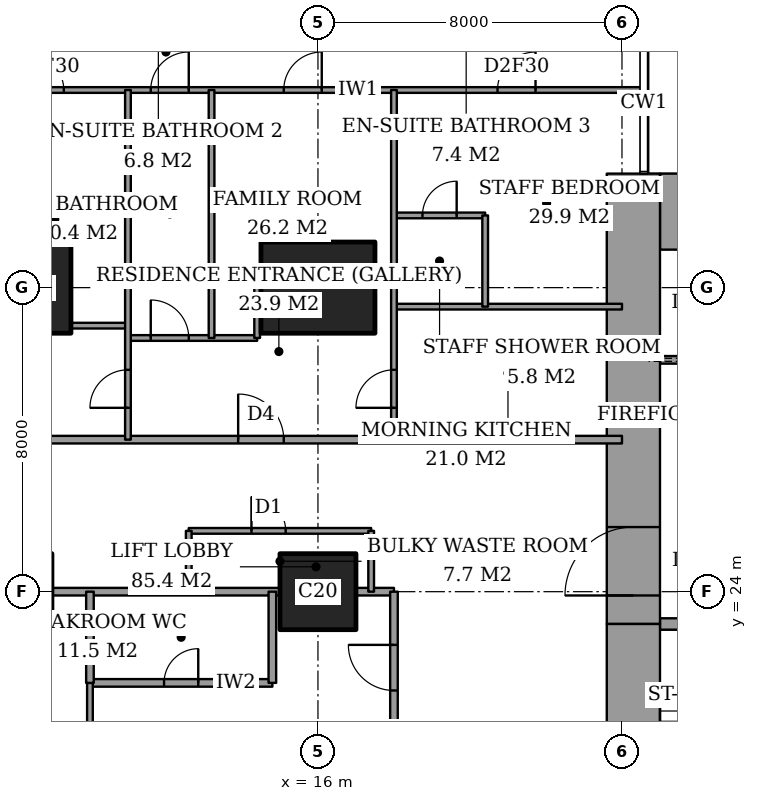
"""IFC4 building model, lengths in metres.
Left out: names, types, materials, properties, quantities, classifications, styles, units other than length and angle.
Written with IfcOpenShell. Run it as: python <this file> out.ifc"""

import sys

from ifc_helpers import new_model, si_unit, direction, frame, frame_2d, origin, origin_2d, place, context, subcontext, project, spatial, rectangle, extrude, element, fill, save


model = new_model("IFC4")
c1 = context("Model", 3, precision=1e-05, world=origin(), true_north=direction((0.0, 1.0)))
c2 = subcontext(c1, "Body", "Model", "MODEL_VIEW")
j1 = project(units=[si_unit("LENGTHUNIT", "METRE"), si_unit("PLANEANGLEUNIT", "RADIAN")], contexts=[c1])
p1 = place(None, origin())
s1 = spatial("IfcSite", under=j1, at=p1, CompositionType="ELEMENT")
p2 = place(p1, origin())
s2 = spatial("IfcBuilding", under=s1, at=p2, CompositionType="ELEMENT")
p3 = place(p2, frame((0.0, 0.0, 128.6)))
s3 = spatial("IfcBuildingStorey", under=s2, at=p3, CompositionType="ELEMENT", Elevation=128.6)
p4 = place(p3, frame((8.0, 32.0, 0.0), z_axis=(0.0, 0.0, 1.0), x_axis=(1.0, 0.0, 0.0)))
e1 = element("IfcColumn", 1, at=p4, inside=s3, PredefinedType="COLUMN", context=c2, shape_type="SweptSolid", body=[
    extrude(rectangle(XDim=3.0, YDim=2.4, at=origin_2d()), origin(), (0.0, 0.0, 1.0), 3.6),
])
p5 = place(p3, frame((16.0, 24.0, 0.0), z_axis=(0.0, 0.0, 1.0), x_axis=(1.0, 0.0, 0.0)))
e2 = element("IfcColumn", 2, at=p5, inside=s3, PredefinedType="COLUMN", context=c2, shape_type="SweptSolid", body=[
    extrude(rectangle(XDim=2.0, YDim=2.0, at=origin_2d()), origin(), (0.0, 0.0, 1.0), 3.6),
])
p6 = place(p3, frame((16.0, 32.0, 0.0), z_axis=(0.0, 0.0, 1.0), x_axis=(1.0, 0.0, 0.0)))
e3 = element("IfcColumn", 3, at=p6, inside=s3, PredefinedType="COLUMN", context=c2, shape_type="SweptSolid", body=[
    extrude(rectangle(XDim=3.0, YDim=2.4, at=origin_2d()), origin(), (0.0, 0.0, 1.0), 3.6),
])
p7 = place(p3, frame((25.0, 34.0, 0.0), z_axis=(0.0, 0.0, 1.0), x_axis=(1.0, 0.0, 0.0)))
e4 = element("IfcWall", 4, at=p7, inside=s3, PredefinedType="SHEAR", context=c2, shape_type="SweptSolid", body=[
    extrude(rectangle(XDim=3.15, YDim=2.0, at=frame_2d((1.575, 0.0))), origin(), (0.0, 0.0, 1.0), 3.6),
])
p8 = place(p3, frame((24.3, 13.0, 0.0), z_axis=(0.0, 0.0, 1.0), x_axis=(0.0, 1.0, 0.0)))
e5 = element("IfcWall", 5, at=p8, inside=s3, PredefinedType="SHEAR", context=c2, shape_type="SweptSolid", body=[
    extrude(rectangle(XDim=10.15, YDim=1.4, at=frame_2d((5.075, 0.0))), origin(), (0.0, 0.0, 1.0), 3.6),
])
p9 = place(p3, frame((24.3, 23.15, 0.0), z_axis=(0.0, 0.0, 1.0), x_axis=(0.0, 1.0, 0.0)))
e6 = element("IfcWall", 6, at=p9, inside=s3, PredefinedType="SHEAR", context=c2, shape_type="SweptSolid", body=[
    extrude(rectangle(XDim=11.85, YDim=1.4, at=frame_2d((5.925, 0.0))), origin(), (0.0, 0.0, 1.0), 3.6),
])
p10 = place(p9, frame((0.75, 0.0, 0.0)))
e7 = element("IfcOpeningElement", 7, at=p10, cuts=e6, PredefinedType="OPENING", context=c2, shape_type="SweptSolid", body=[
    extrude(rectangle(XDim=1.8, YDim=2.4, at=frame_2d((0.9, 1.2))), frame((0.0, 0.71, 0.0), z_axis=(0.0, -1.0, 0.0), x_axis=(1.0, 0.0, 0.0)), (0.0, 0.0, 1.0), 1.42),
])
p11 = place(p3, frame((25.0, 23.15, 0.0), z_axis=(0.0, 0.0, 1.0), x_axis=(1.0, 0.0, 0.0)))
e8 = element("IfcWall", 8, at=p11, inside=s3, PredefinedType="SHEAR", context=c2, shape_type="SweptSolid", body=[
    extrude(rectangle(XDim=3.15, YDim=0.3, at=frame_2d((1.575, 0.0))), origin(), (0.0, 0.0, 1.0), 3.6),
])
p12 = place(p11, frame((0.6, 0.0, 0.0)))
e9 = element("IfcOpeningElement", 9, at=p12, cuts=e8, PredefinedType="OPENING", context=c2, shape_type="SweptSolid", body=[
    extrude(rectangle(XDim=1.0, YDim=2.1, at=frame_2d((0.5, 1.05))), frame((0.0, 0.16, 0.0), z_axis=(0.0, -1.0, 0.0), x_axis=(1.0, 0.0, 0.0)), (0.0, 0.0, 1.0), 0.32),
])
p13 = place(p3, frame((10.0, 21.6, 0.0), z_axis=(0.0, 0.0, 1.0), x_axis=(1.0, 0.0, 0.0)))
e10 = element("IfcWall", 10, at=p13, inside=s3, PredefinedType="PARTITIONING", context=c2, shape_type="SweptSolid", body=[
    extrude(rectangle(XDim=4.8, YDim=0.2, at=frame_2d((2.4, 0.0))), origin(), (0.0, 0.0, 1.0), 3.35),
])
p14 = place(p13, frame((1.95, 0.0, 0.0)))
e11 = element("IfcOpeningElement", 11, at=p14, cuts=e10, PredefinedType="OPENING", context=c2, shape_type="SweptSolid", body=[
    extrude(rectangle(XDim=0.9, YDim=2.1, at=frame_2d((0.45, 1.05))), frame((0.0, 0.11, 0.0), z_axis=(0.0, -1.0, 0.0), x_axis=(1.0, 0.0, 0.0)), (0.0, 0.0, 1.0), 0.22),
])
p15 = place(p3, frame((9.0, 24.0, 0.0), z_axis=(0.0, 0.0, 1.0), x_axis=(1.0, 0.0, 0.0)))
e12 = element("IfcWall", 12, at=p15, inside=s3, PredefinedType="PARTITIONING", context=c2, shape_type="SweptSolid", body=[
    extrude(rectangle(XDim=6.0, YDim=0.2, at=frame_2d((3.0, 0.0))), origin(), (0.0, 0.0, 1.0), 3.35),
])
p16 = place(p3, frame((17.0, 24.0, 0.0), z_axis=(0.0, 0.0, 1.0), x_axis=(1.0, 0.0, 0.0)))
e13 = element("IfcWall", 13, at=p16, inside=s3, PredefinedType="PARTITIONING", context=c2, shape_type="SweptSolid", body=[
    extrude(rectangle(XDim=1.0, YDim=0.2, at=frame_2d((0.5, 0.0))), origin(), (0.0, 0.0, 1.0), 3.35),
])
p17 = place(p3, frame((12.6, 25.6, 0.0), z_axis=(0.0, 0.0, 1.0), x_axis=(1.0, 0.0, 0.0)))
e14 = element("IfcWall", 14, at=p17, inside=s3, PredefinedType="PARTITIONING", context=c2, shape_type="SweptSolid", body=[
    extrude(rectangle(XDim=4.8, YDim=0.15, at=frame_2d((2.4, 0.0))), origin(), (0.0, 0.0, 1.0), 3.35),
])
p18 = place(p17, frame((1.65, 0.0, 0.0)))
e15 = element("IfcOpeningElement", 15, at=p18, cuts=e14, PredefinedType="OPENING", context=c2, shape_type="SweptSolid", body=[
    extrude(rectangle(XDim=0.9, YDim=2.1, at=frame_2d((0.45, 1.05))), frame((0.0, 0.085, 0.0), z_axis=(0.0, -1.0, 0.0), x_axis=(1.0, 0.0, 0.0)), (0.0, 0.0, 1.0), 0.17),
])
p19 = place(p3, frame((6.725, 28.0, 0.0), z_axis=(0.0, 0.0, 1.0), x_axis=(1.0, 0.0, 0.0)))
e16 = element("IfcWall", 16, at=p19, inside=s3, PredefinedType="PARTITIONING", context=c2, shape_type="SweptSolid", body=[
    extrude(rectangle(XDim=17.275, YDim=0.2, at=frame_2d((8.637, 0.0))), origin(), (0.0, 0.0, 1.0), 3.35),
])
p20 = place(p19, frame((7.175, 0.0, 0.0)))
e17 = element("IfcOpeningElement", 17, at=p20, cuts=e16, PredefinedType="OPENING", context=c2, shape_type="SweptSolid", body=[
    extrude(rectangle(XDim=1.2, YDim=2.4, at=frame_2d((0.6, 1.2))), frame((0.0, 0.11, 0.0), z_axis=(0.0, -1.0, 0.0), x_axis=(1.0, 0.0, 0.0)), (0.0, 0.0, 1.0), 0.22),
])
p21 = place(p3, frame((11.0, 30.675, 0.0), z_axis=(0.0, 0.0, 1.0), x_axis=(1.0, 0.0, 0.0)))
e18 = element("IfcWall", 18, at=p21, inside=s3, PredefinedType="PARTITIONING", context=c2, shape_type="SweptSolid", body=[
    extrude(rectangle(XDim=3.4, YDim=0.15, at=frame_2d((1.7, 0.0))), origin(), (0.0, 0.0, 1.0), 3.35),
])
p22 = place(p21, frame((0.6, 0.0, 0.0)))
e19 = element("IfcOpeningElement", 19, at=p22, cuts=e18, PredefinedType="OPENING", context=c2, shape_type="SweptSolid", body=[
    extrude(rectangle(XDim=1.0, YDim=2.1, at=frame_2d((0.5, 1.05))), frame((0.0, 0.085, 0.0), z_axis=(0.0, -1.0, 0.0), x_axis=(1.0, 0.0, 0.0)), (0.0, 0.0, 1.0), 0.17),
])
p23 = place(p3, frame((9.5, 31.0, 0.0), z_axis=(0.0, 0.0, 1.0), x_axis=(1.0, 0.0, 0.0)))
e20 = element("IfcWall", 20, at=p23, inside=s3, PredefinedType="PARTITIONING", context=c2, shape_type="SweptSolid", body=[
    extrude(rectangle(XDim=1.5, YDim=0.15, at=frame_2d((0.75, 0.0))), origin(), (0.0, 0.0, 1.0), 3.35),
])
p24 = place(p3, frame((18.0, 31.5, 0.0), z_axis=(0.0, 0.0, 1.0), x_axis=(1.0, 0.0, 0.0)))
e21 = element("IfcWall", 21, at=p24, inside=s3, PredefinedType="PARTITIONING", context=c2, shape_type="SweptSolid", body=[
    extrude(rectangle(XDim=6.0, YDim=0.15, at=frame_2d((3.0, 0.0))), origin(), (0.0, 0.0, 1.0), 3.35),
])
p25 = place(p3, frame((17.5, 32.1, 0.0), z_axis=(0.0, 0.0, 1.0), x_axis=(1.0, 0.0, 0.0)))
e22 = element("IfcWall", 22, at=p25, inside=s3, PredefinedType="PARTITIONING", context=c2, shape_type="SweptSolid", body=[
    extrude(rectangle(XDim=0.5, YDim=0.15, at=frame_2d((0.25, 0.0))), origin(), (0.0, 0.0, 1.0), 3.35),
])
p26 = place(p3, frame((18.0, 33.9, 0.0), z_axis=(0.0, 0.0, 1.0), x_axis=(1.0, 0.0, 0.0)))
e23 = element("IfcWall", 23, at=p26, inside=s3, PredefinedType="PARTITIONING", context=c2, shape_type="SweptSolid", body=[
    extrude(rectangle(XDim=2.4, YDim=0.15, at=frame_2d((1.2, 0.0))), origin(), (0.0, 0.0, 1.0), 3.35),
])
p27 = place(p26, frame((0.75, 0.0, 0.0)))
e24 = element("IfcOpeningElement", 24, at=p27, cuts=e23, PredefinedType="OPENING", context=c2, shape_type="SweptSolid", body=[
    extrude(rectangle(XDim=0.9, YDim=2.1, at=frame_2d((0.45, 1.05))), frame((0.0, 0.085, 0.0), z_axis=(0.0, -1.0, 0.0), x_axis=(1.0, 0.0, 0.0)), (0.0, 0.0, 1.0), 0.17),
])
p28 = place(p3, frame((-0.45, 37.2, 0.0), z_axis=(0.0, 0.0, 1.0), x_axis=(1.0, 0.0, 0.0)))
e25 = element("IfcWall", 25, at=p28, inside=s3, PredefinedType="PARTITIONING", context=c2, shape_type="SweptSolid", body=[
    extrude(rectangle(XDim=25.011, YDim=0.15, at=frame_2d((12.505, 0.0))), origin(), (0.0, 0.0, 1.0), 3.35),
])
p29 = place(p28, frame((12.05, 0.0, 0.0)))
e26 = element("IfcOpeningElement", 26, at=p29, cuts=e25, PredefinedType="OPENING", context=c2, shape_type="SweptSolid", body=[
    extrude(rectangle(XDim=1.0, YDim=2.1, at=frame_2d((0.5, 1.05))), frame((0.0, 0.085, 0.0), z_axis=(0.0, -1.0, 0.0), x_axis=(1.0, 0.0, 0.0)), (0.0, 0.0, 1.0), 0.17),
])
p30 = place(p28, frame((3.087, 0.0, 0.0)))
e27 = element("IfcOpeningElement", 27, at=p30, cuts=e25, PredefinedType="OPENING", context=c2, shape_type="SweptSolid", body=[
    extrude(rectangle(XDim=1.0, YDim=2.1, at=frame_2d((0.5, 1.05))), frame((0.0, 0.085, 0.0), z_axis=(0.0, -1.0, 0.0), x_axis=(1.0, 0.0, 0.0)), (0.0, 0.0, 1.0), 0.17),
])
p31 = place(p28, frame((8.863, 0.0, 0.0)))
e28 = element("IfcOpeningElement", 28, at=p31, cuts=e25, PredefinedType="OPENING", context=c2, shape_type="SweptSolid", body=[
    extrude(rectangle(XDim=0.9, YDim=2.1, at=frame_2d((0.45, 1.05))), frame((0.0, 0.085, 0.0), z_axis=(0.0, -1.0, 0.0), x_axis=(1.0, 0.0, 0.0)), (0.0, 0.0, 1.0), 0.17),
])
p32 = place(p28, frame((15.55, 0.0, 0.0)))
e29 = element("IfcOpeningElement", 29, at=p32, cuts=e25, PredefinedType="OPENING", context=c2, shape_type="SweptSolid", body=[
    extrude(rectangle(XDim=1.0, YDim=2.1, at=frame_2d((0.5, 1.05))), frame((0.0, 0.085, 0.0), z_axis=(0.0, -1.0, 0.0), x_axis=(1.0, 0.0, 0.0)), (0.0, 0.0, 1.0), 0.17),
])
p33 = place(p28, frame((21.175, 0.0, 0.0)))
e30 = element("IfcOpeningElement", 30, at=p33, cuts=e25, PredefinedType="OPENING", context=c2, shape_type="SweptSolid", body=[
    extrude(rectangle(XDim=1.0, YDim=2.1, at=frame_2d((0.5, 1.05))), frame((0.0, 0.085, 0.0), z_axis=(0.0, -1.0, 0.0), x_axis=(1.0, 0.0, 0.0)), (0.0, 0.0, 1.0), 0.17),
])
p34 = place(p3, frame((10.0, 21.6, 0.0), z_axis=(0.0, 0.0, 1.0), x_axis=(0.0, 1.0, 0.0)))
e31 = element("IfcWall", 31, at=p34, inside=s3, PredefinedType="PARTITIONING", context=c2, shape_type="SweptSolid", body=[
    extrude(rectangle(XDim=2.4, YDim=0.2, at=frame_2d((1.2, 0.0))), origin(), (0.0, 0.0, 1.0), 3.35),
])
p35 = place(p3, frame((10.0, 10.6, 0.0), z_axis=(0.0, 0.0, 1.0), x_axis=(0.0, 1.0, 0.0)))
e32 = element("IfcWall", 32, at=p35, inside=s3, PredefinedType="PARTITIONING", context=c2, shape_type="SweptSolid", body=[
    extrude(rectangle(XDim=11.0, YDim=0.15, at=frame_2d((5.5, 0.0))), origin(), (0.0, 0.0, 1.0), 3.35),
])
p36 = place(p35, frame((8.2, 0.0, 0.0)))
e33 = element("IfcOpeningElement", 33, at=p36, cuts=e32, PredefinedType="OPENING", context=c2, shape_type="SweptSolid", body=[
    extrude(rectangle(XDim=1.0, YDim=2.1, at=frame_2d((0.5, 1.05))), frame((0.0, 0.085, 0.0), z_axis=(0.0, -1.0, 0.0), x_axis=(1.0, 0.0, 0.0)), (0.0, 0.0, 1.0), 0.17),
])
p37 = place(p3, frame((11.0, 28.0, 0.0), z_axis=(0.0, 0.0, 1.0), x_axis=(0.0, 1.0, 0.0)))
e34 = element("IfcWall", 34, at=p37, inside=s3, PredefinedType="PARTITIONING", context=c2, shape_type="SweptSolid", body=[
    extrude(rectangle(XDim=9.2, YDim=0.15, at=frame_2d((4.6, 0.0))), origin(), (0.0, 0.0, 1.0), 3.35),
])
p38 = place(p37, frame((0.837, 0.0, 0.0)))
e35 = element("IfcOpeningElement", 35, at=p38, cuts=e34, PredefinedType="OPENING", context=c2, shape_type="SweptSolid", body=[
    extrude(rectangle(XDim=1.0, YDim=2.1, at=frame_2d((0.5, 1.05))), frame((0.0, 0.085, 0.0), z_axis=(0.0, -1.0, 0.0), x_axis=(1.0, 0.0, 0.0)), (0.0, 0.0, 1.0), 0.17),
])
p39 = place(p3, frame((12.6, 24.0, 0.0), z_axis=(0.0, 0.0, 1.0), x_axis=(0.0, 1.0, 0.0)))
e36 = element("IfcWall", 36, at=p39, inside=s3, PredefinedType="PARTITIONING", context=c2, shape_type="SweptSolid", body=[
    extrude(rectangle(XDim=1.6, YDim=0.15, at=frame_2d((0.8, 0.0))), origin(), (0.0, 0.0, 1.0), 3.35),
])
p40 = place(p3, frame((13.2, 30.675, 0.0), z_axis=(0.0, 0.0, 1.0), x_axis=(0.0, 1.0, 0.0)))
e37 = element("IfcWall", 37, at=p40, inside=s3, PredefinedType="PARTITIONING", context=c2, shape_type="SweptSolid", body=[
    extrude(rectangle(XDim=6.525, YDim=0.15, at=frame_2d((3.262, 0.0))), origin(), (0.0, 0.0, 1.0), 3.35),
])
p41 = place(p3, frame((14.4, 30.675, 0.0), z_axis=(0.0, 0.0, 1.0), x_axis=(0.0, 1.0, 0.0)))
e38 = element("IfcWall", 38, at=p41, inside=s3, PredefinedType="PARTITIONING", context=c2, shape_type="SweptSolid", body=[
    extrude(rectangle(XDim=1.425, YDim=0.15, at=frame_2d((0.712, 0.0))), origin(), (0.0, 0.0, 1.0), 3.35),
])
p42 = place(p3, frame((14.8, 21.6, 0.0), z_axis=(0.0, 0.0, 1.0), x_axis=(0.0, 1.0, 0.0)))
e39 = element("IfcWall", 39, at=p42, inside=s3, PredefinedType="PARTITIONING", context=c2, shape_type="SweptSolid", body=[
    extrude(rectangle(XDim=2.4, YDim=0.2, at=frame_2d((1.2, 0.0))), origin(), (0.0, 0.0, 1.0), 3.35),
])
p43 = place(p3, frame((17.4, 24.0, 0.0), z_axis=(0.0, 0.0, 1.0), x_axis=(0.0, 1.0, 0.0)))
e40 = element("IfcWall", 40, at=p43, inside=s3, PredefinedType="PARTITIONING", context=c2, shape_type="SweptSolid", body=[
    extrude(rectangle(XDim=1.6, YDim=0.15, at=frame_2d((0.8, 0.0))), origin(), (0.0, 0.0, 1.0), 3.35),
])
p44 = place(p3, frame((18.0, 17.0, 0.0), z_axis=(0.0, 0.0, 1.0), x_axis=(0.0, 1.0, 0.0)))
e41 = element("IfcWall", 41, at=p44, inside=s3, PredefinedType="PARTITIONING", context=c2, shape_type="SweptSolid", body=[
    extrude(rectangle(XDim=7.0, YDim=0.2, at=frame_2d((3.5, 0.0))), origin(), (0.0, 0.0, 1.0), 3.35),
])
p45 = place(p44, frame((4.4, 0.0, 0.0)))
e42 = element("IfcOpeningElement", 42, at=p45, cuts=e41, PredefinedType="OPENING", context=c2, shape_type="SweptSolid", body=[
    extrude(rectangle(XDim=1.2, YDim=2.4, at=frame_2d((0.6, 1.2))), frame((0.0, 0.11, 0.0), z_axis=(0.0, -1.0, 0.0), x_axis=(1.0, 0.0, 0.0)), (0.0, 0.0, 1.0), 0.22),
])
p46 = place(p44, frame((1.05, 0.0, 0.0)))
e43 = element("IfcOpeningElement", 43, at=p46, cuts=e41, PredefinedType="OPENING", context=c2, shape_type="SweptSolid", body=[
    extrude(rectangle(XDim=0.9, YDim=2.1, at=frame_2d((0.45, 1.05))), frame((0.0, 0.11, 0.0), z_axis=(0.0, -1.0, 0.0), x_axis=(1.0, 0.0, 0.0)), (0.0, 0.0, 1.0), 0.22),
])
p47 = place(p3, frame((18.0, 28.0, 0.0), z_axis=(0.0, 0.0, 1.0), x_axis=(0.0, 1.0, 0.0)))
e44 = element("IfcWall", 44, at=p47, inside=s3, PredefinedType="PARTITIONING", context=c2, shape_type="SweptSolid", body=[
    extrude(rectangle(XDim=9.2, YDim=0.15, at=frame_2d((4.6, 0.0))), origin(), (0.0, 0.0, 1.0), 3.35),
])
p48 = place(p47, frame((0.837, 0.0, 0.0)))
e45 = element("IfcOpeningElement", 45, at=p48, cuts=e44, PredefinedType="OPENING", context=c2, shape_type="SweptSolid", body=[
    extrude(rectangle(XDim=1.0, YDim=2.1, at=frame_2d((0.5, 1.05))), frame((0.0, 0.085, 0.0), z_axis=(0.0, -1.0, 0.0), x_axis=(1.0, 0.0, 0.0)), (0.0, 0.0, 1.0), 0.17),
])
p49 = place(p3, frame((20.4, 31.5, 0.0), z_axis=(0.0, 0.0, 1.0), x_axis=(0.0, 1.0, 0.0)))
e46 = element("IfcWall", 46, at=p49, inside=s3, PredefinedType="PARTITIONING", context=c2, shape_type="SweptSolid", body=[
    extrude(rectangle(XDim=2.4, YDim=0.15, at=frame_2d((1.2, 0.0))), origin(), (0.0, 0.0, 1.0), 3.35),
])
p50 = place(p3, frame((25.0, 30.1, 0.0), z_axis=(0.0, 0.0, 1.0), x_axis=(1.0, 0.0, 0.0)))
e47 = element("IfcWall", 47, at=p50, inside=s3, PredefinedType="PARTITIONING", context=c2, shape_type="SweptSolid", body=[
    extrude(rectangle(XDim=12.7, YDim=0.2, at=frame_2d((6.35, 0.0))), origin(), (0.0, 0.0, 1.0), 3.6),
])
p51 = place(p50, frame((0.9, 0.0, 0.0)))
e48 = element("IfcOpeningElement", 48, at=p51, cuts=e47, PredefinedType="OPENING", context=c2, shape_type="SweptSolid", body=[
    extrude(rectangle(XDim=1.2, YDim=2.1, at=frame_2d((0.6, 1.05))), frame((0.0, 0.11, 0.0), z_axis=(0.0, -1.0, 0.0), x_axis=(1.0, 0.0, 0.0)), (0.0, 0.0, 1.0), 0.22),
])
p52 = place(p14, origin())
e49 = element("IfcDoor", 49, at=p52, inside=s3, OperationType="SINGLE_SWING_LEFT", PredefinedType="DOOR", context=c2, shape_type="SweptSolid", body=[
    extrude(rectangle(XDim=0.9, YDim=2.1, at=frame_2d((0.45, 1.05))), frame((0.0, 0.025, 0.0), z_axis=(0.0, -1.0, 0.0), x_axis=(1.0, 0.0, 0.0)), (0.0, 0.0, 1.0), 0.05),
])
fill(e11, e49)
p53 = place(p45, origin())
e50 = element("IfcDoor", 50, at=p53, inside=s3, OperationType="SINGLE_SWING_LEFT", PredefinedType="DOOR", context=c2, shape_type="SweptSolid", body=[
    extrude(rectangle(XDim=1.2, YDim=2.4, at=frame_2d((0.6, 1.2))), frame((0.0, 0.025, 0.0), z_axis=(0.0, -1.0, 0.0), x_axis=(1.0, 0.0, 0.0)), (0.0, 0.0, 1.0), 0.05),
])
fill(e42, e50)
p54 = place(p29, origin())
e51 = element("IfcDoor", 51, at=p54, inside=s3, OperationType="SINGLE_SWING_LEFT", PredefinedType="DOOR", context=c2, shape_type="SweptSolid", body=[
    extrude(rectangle(XDim=1.0, YDim=2.1, at=frame_2d((0.5, 1.05))), frame((0.0, 0.025, 0.0), z_axis=(0.0, -1.0, 0.0), x_axis=(1.0, 0.0, 0.0)), (0.0, 0.0, 1.0), 0.05),
])
fill(e26, e51)
p55 = place(p31, origin())
e52 = element("IfcDoor", 52, at=p55, inside=s3, OperationType="SINGLE_SWING_RIGHT", PredefinedType="DOOR", context=c2, shape_type="SweptSolid", body=[
    extrude(rectangle(XDim=0.9, YDim=2.1, at=frame_2d((0.45, 1.05))), frame((0.0, 0.025, 0.0), z_axis=(0.0, -1.0, 0.0), x_axis=(1.0, 0.0, 0.0)), (0.0, 0.0, 1.0), 0.05),
])
fill(e28, e52)
p56 = place(p38, origin())
e53 = element("IfcDoor", 53, at=p56, inside=s3, OperationType="SINGLE_SWING_RIGHT", PredefinedType="DOOR", context=c2, shape_type="SweptSolid", body=[
    extrude(rectangle(XDim=1.0, YDim=2.1, at=frame_2d((0.5, 1.05))), frame((0.0, 0.025, 0.0), z_axis=(0.0, -1.0, 0.0), x_axis=(1.0, 0.0, 0.0)), (0.0, 0.0, 1.0), 0.05),
])
fill(e35, e53)
p57 = place(p20, origin())
e54 = element("IfcDoor", 54, at=p57, inside=s3, OperationType="SINGLE_SWING_RIGHT", PredefinedType="DOOR", context=c2, shape_type="SweptSolid", body=[
    extrude(rectangle(XDim=1.2, YDim=2.4, at=frame_2d((0.6, 1.2))), frame((0.0, 0.025, 0.0), z_axis=(0.0, -1.0, 0.0), x_axis=(1.0, 0.0, 0.0)), (0.0, 0.0, 1.0), 0.05),
])
fill(e17, e54)
p58 = place(p22, origin())
e55 = element("IfcDoor", 55, at=p58, inside=s3, OperationType="SINGLE_SWING_RIGHT", PredefinedType="DOOR", context=c2, shape_type="SweptSolid", body=[
    extrude(rectangle(XDim=1.0, YDim=2.1, at=frame_2d((0.5, 1.05))), frame((0.0, 0.025, 0.0), z_axis=(0.0, -1.0, 0.0), x_axis=(1.0, 0.0, 0.0)), (0.0, 0.0, 1.0), 0.05),
])
fill(e19, e55)
p59 = place(p32, origin())
e56 = element("IfcDoor", 56, at=p59, inside=s3, OperationType="SINGLE_SWING_LEFT", PredefinedType="DOOR", context=c2, shape_type="SweptSolid", body=[
    extrude(rectangle(XDim=1.0, YDim=2.1, at=frame_2d((0.5, 1.05))), frame((0.0, 0.025, 0.0), z_axis=(0.0, -1.0, 0.0), x_axis=(1.0, 0.0, 0.0)), (0.0, 0.0, 1.0), 0.05),
])
fill(e29, e56)
p60 = place(p27, origin())
e57 = element("IfcDoor", 57, at=p60, inside=s3, OperationType="SINGLE_SWING_LEFT", PredefinedType="DOOR", context=c2, shape_type="SweptSolid", body=[
    extrude(rectangle(XDim=0.9, YDim=2.1, at=frame_2d((0.45, 1.05))), frame((0.0, 0.025, 0.0), z_axis=(0.0, -1.0, 0.0), x_axis=(1.0, 0.0, 0.0)), (0.0, 0.0, 1.0), 0.05),
])
fill(e24, e57)
p61 = place(p33, origin())
e58 = element("IfcDoor", 58, at=p61, inside=s3, OperationType="SINGLE_SWING_LEFT", PredefinedType="DOOR", context=c2, shape_type="SweptSolid", body=[
    extrude(rectangle(XDim=1.0, YDim=2.1, at=frame_2d((0.5, 1.05))), frame((0.0, 0.025, 0.0), z_axis=(0.0, -1.0, 0.0), x_axis=(1.0, 0.0, 0.0)), (0.0, 0.0, 1.0), 0.05),
])
fill(e30, e58)
p62 = place(p48, origin())
e59 = element("IfcDoor", 59, at=p62, inside=s3, OperationType="SINGLE_SWING_RIGHT", PredefinedType="DOOR", context=c2, shape_type="SweptSolid", body=[
    extrude(rectangle(XDim=1.0, YDim=2.1, at=frame_2d((0.5, 1.05))), frame((0.0, 0.025, 0.0), z_axis=(0.0, -1.0, 0.0), x_axis=(1.0, 0.0, 0.0)), (0.0, 0.0, 1.0), 0.05),
])
fill(e45, e59)
p63 = place(p18, origin())
e60 = element("IfcDoor", 60, at=p63, inside=s3, OperationType="SINGLE_SWING_RIGHT", PredefinedType="DOOR", context=c2, shape_type="SweptSolid", body=[
    extrude(rectangle(XDim=0.9, YDim=2.1, at=frame_2d((0.45, 1.05))), frame((0.0, 0.025, 0.0), z_axis=(0.0, -1.0, 0.0), x_axis=(1.0, 0.0, 0.0)), (0.0, 0.0, 1.0), 0.05),
])
fill(e15, e60)
p64 = place(p10, origin())
e61 = element("IfcDoor", 61, at=p64, inside=s3, OperationType="DOUBLE_DOOR_DOUBLE_SWING", PredefinedType="DOOR", context=c2, shape_type="SweptSolid", body=[
    extrude(rectangle(XDim=1.8, YDim=2.4, at=frame_2d((0.9, 1.2))), frame((0.0, 0.025, 0.0), z_axis=(0.0, -1.0, 0.0), x_axis=(1.0, 0.0, 0.0)), (0.0, 0.0, 1.0), 0.05),
])
fill(e7, e61)
save(model, sys.argv[1])
